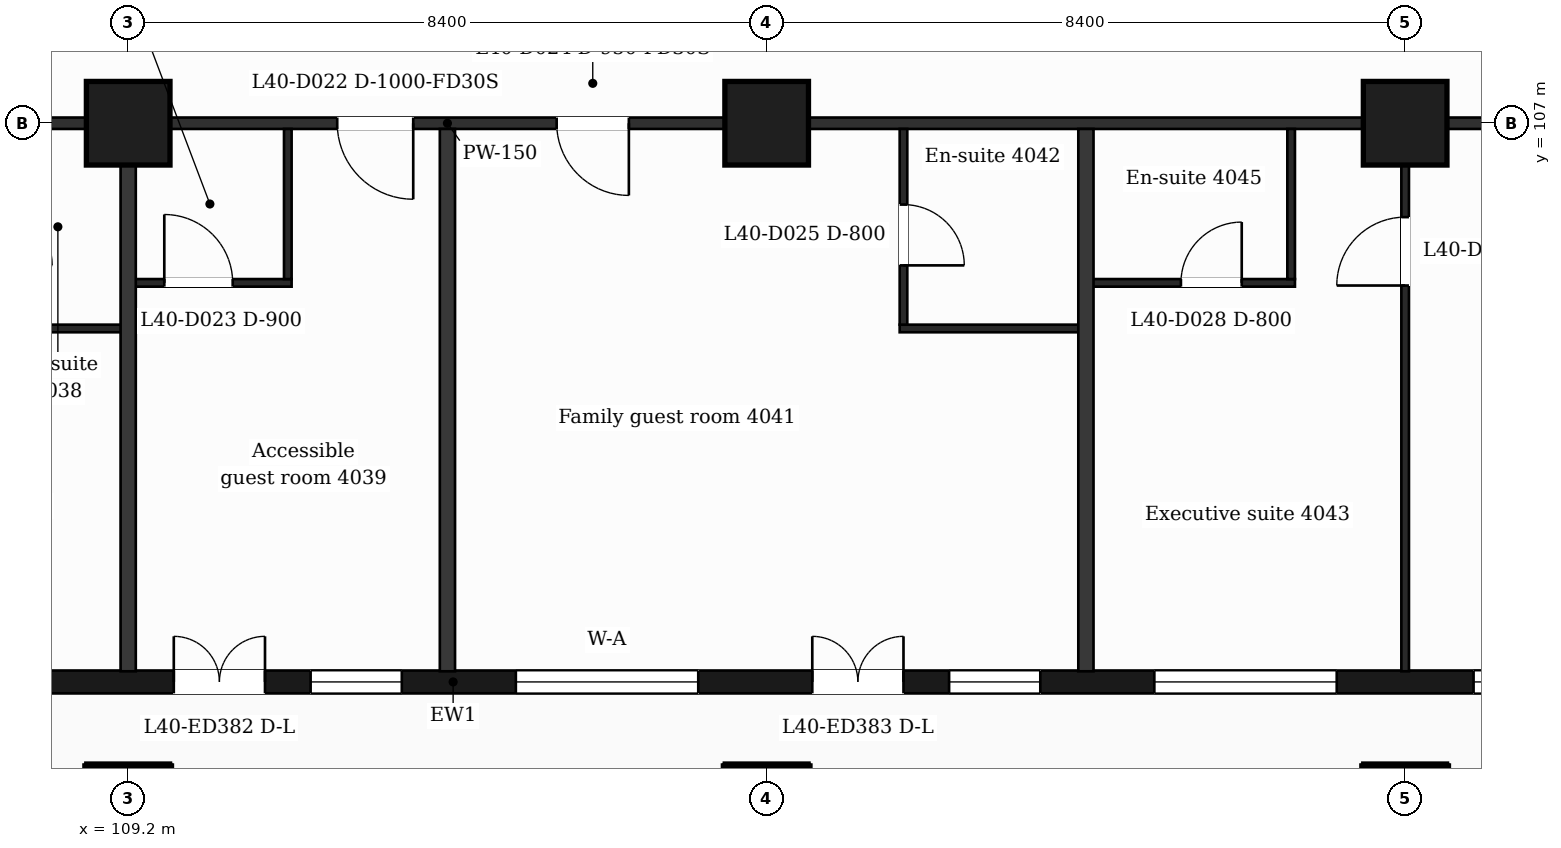
"""IFC4 building model, lengths in metres.
Left out: names, types, materials, properties, quantities, classifications, styles, units other than length and angle.
Written with IfcOpenShell. Run it as: python <this file> out.ifc"""

import sys

from ifc_helpers import new_model, si_unit, direction, frame, frame_2d, origin, origin_2d, place, context, subcontext, project, spatial, rectangle, extrude, element, fill, save


model = new_model("IFC4")
c1 = context("Model", 3, precision=1e-05, world=origin(), true_north=direction((0.0, 1.0)))
c2 = subcontext(c1, "Body", "Model", "MODEL_VIEW")
j1 = project(units=[si_unit("LENGTHUNIT", "METRE"), si_unit("PLANEANGLEUNIT", "RADIAN")], contexts=[c1])
p1 = place(None, origin())
s1 = spatial("IfcSite", under=j1, at=p1, CompositionType="ELEMENT")
p2 = place(p1, origin())
s2 = spatial("IfcBuilding", under=s1, at=p2, CompositionType="ELEMENT")
p3 = place(p2, frame((0.0, 0.0, 170.0)))
s3 = spatial("IfcBuildingStorey", under=s2, at=p3, CompositionType="ELEMENT", Elevation=170.0)
for number, where, z_axis, x_axis in (
    (1, (109.2, 98.0, 0.0), (0.0, 0.0, 1.0), (1.0, 0.0, 0.0)),
    (2, (117.6, 98.0, 0.0), (0.0, 0.0, 1.0), (1.0, 0.0, 0.0)),
    (3, (126.0, 98.0, 0.0), (0.0, 0.0, 1.0), (1.0, 0.0, 0.0)),
    (4, (109.2, 107.0, 0.0), (0.0, 0.0, 1.0), (1.0, 0.0, 0.0)),
    (5, (117.6, 107.0, 0.0), (0.0, 0.0, 1.0), (1.0, 0.0, 0.0)),
    (6, (126.0, 107.0, 0.0), (0.0, 0.0, 1.0), (1.0, 0.0, 0.0)),
):
    element("IfcColumn", number, at=place(p3, frame(where, z_axis=z_axis, x_axis=x_axis)), inside=s3, PredefinedType="COLUMN", context=c2, shape_type="SweptSolid", body=[
        extrude(rectangle(XDim=1.1, YDim=1.1, at=origin_2d()), origin(), (0.0, 0.0, 1.0), 3.7),
    ])
p4 = place(p3, frame((89.85, 99.65, 0.0), z_axis=(0.0, 0.0, 1.0), x_axis=(1.0, 0.0, 0.0)))
e7 = element("IfcWall", 7, at=p4, inside=s3, PredefinedType="SOLIDWALL", context=c2, shape_type="SweptSolid", body=[
    extrude(rectangle(XDim=47.25, YDim=0.3, at=frame_2d((23.625, 0.0))), origin(), (0.0, 0.0, 1.0), 3.38),
])
p5 = place(p4, frame((0.725, 0.0, 0.9)))
e8 = element("IfcOpeningElement", 8, at=p5, cuts=e7, PredefinedType="OPENING", context=c2, shape_type="SweptSolid", body=[
    extrude(rectangle(XDim=1.2, YDim=2.1, at=frame_2d((0.6, 1.05))), frame((0.0, 0.16, 0.0), z_axis=(0.0, -1.0, 0.0), x_axis=(1.0, 0.0, 0.0)), (0.0, 0.0, 1.0), 0.32),
])
p6 = place(p4, frame((3.45, 0.0, 0.9)))
e9 = element("IfcOpeningElement", 9, at=p6, cuts=e7, PredefinedType="OPENING", context=c2, shape_type="SweptSolid", body=[
    extrude(rectangle(XDim=2.4, YDim=2.1, at=frame_2d((1.2, 1.05))), frame((0.0, 0.16, 0.0), z_axis=(0.0, -1.0, 0.0), x_axis=(1.0, 0.0, 0.0)), (0.0, 0.0, 1.0), 0.32),
])
p7 = place(p4, frame((7.65, 0.0, 0.9)))
e10 = element("IfcOpeningElement", 10, at=p7, cuts=e7, PredefinedType="OPENING", context=c2, shape_type="SweptSolid", body=[
    extrude(rectangle(XDim=2.4, YDim=2.1, at=frame_2d((1.2, 1.05))), frame((0.0, 0.16, 0.0), z_axis=(0.0, -1.0, 0.0), x_axis=(1.0, 0.0, 0.0)), (0.0, 0.0, 1.0), 0.32),
])
p8 = place(p4, frame((12.45, 0.0, 0.9)))
e11 = element("IfcOpeningElement", 11, at=p8, cuts=e7, PredefinedType="OPENING", context=c2, shape_type="SweptSolid", body=[
    extrude(rectangle(XDim=1.2, YDim=2.1, at=frame_2d((0.6, 1.05))), frame((0.0, 0.16, 0.0), z_axis=(0.0, -1.0, 0.0), x_axis=(1.0, 0.0, 0.0)), (0.0, 0.0, 1.0), 0.32),
])
p9 = place(p4, frame((16.65, 0.0, 0.9)))
e12 = element("IfcOpeningElement", 12, at=p9, cuts=e7, PredefinedType="OPENING", context=c2, shape_type="SweptSolid", body=[
    extrude(rectangle(XDim=1.2, YDim=2.1, at=frame_2d((0.6, 1.05))), frame((0.0, 0.16, 0.0), z_axis=(0.0, -1.0, 0.0), x_axis=(1.0, 0.0, 0.0)), (0.0, 0.0, 1.0), 0.32),
])
p10 = place(p4, frame((19.95, 0.0, 0.0)))
e13 = element("IfcOpeningElement", 13, at=p10, cuts=e7, PredefinedType="OPENING", context=c2, shape_type="SweptSolid", body=[
    extrude(rectangle(XDim=1.2, YDim=2.4, at=frame_2d((0.6, 1.2))), frame((0.0, 0.16, 0.0), z_axis=(0.0, -1.0, 0.0), x_axis=(1.0, 0.0, 0.0)), (0.0, 0.0, 1.0), 0.32),
])
p11 = place(p4, frame((21.75, 0.0, 0.9)))
e14 = element("IfcOpeningElement", 14, at=p11, cuts=e7, PredefinedType="OPENING", context=c2, shape_type="SweptSolid", body=[
    extrude(rectangle(XDim=1.2, YDim=2.1, at=frame_2d((0.6, 1.05))), frame((0.0, 0.16, 0.0), z_axis=(0.0, -1.0, 0.0), x_axis=(1.0, 0.0, 0.0)), (0.0, 0.0, 1.0), 0.32),
])
p12 = place(p4, frame((24.45, 0.0, 0.9)))
e15 = element("IfcOpeningElement", 15, at=p12, cuts=e7, PredefinedType="OPENING", context=c2, shape_type="SweptSolid", body=[
    extrude(rectangle(XDim=2.4, YDim=2.1, at=frame_2d((1.2, 1.05))), frame((0.0, 0.16, 0.0), z_axis=(0.0, -1.0, 0.0), x_axis=(1.0, 0.0, 0.0)), (0.0, 0.0, 1.0), 0.32),
])
p13 = place(p4, frame((28.35, 0.0, 0.0)))
e16 = element("IfcOpeningElement", 16, at=p13, cuts=e7, PredefinedType="OPENING", context=c2, shape_type="SweptSolid", body=[
    extrude(rectangle(XDim=1.2, YDim=2.4, at=frame_2d((0.6, 1.2))), frame((0.0, 0.16, 0.0), z_axis=(0.0, -1.0, 0.0), x_axis=(1.0, 0.0, 0.0)), (0.0, 0.0, 1.0), 0.32),
])
p14 = place(p4, frame((30.15, 0.0, 0.9)))
e17 = element("IfcOpeningElement", 17, at=p14, cuts=e7, PredefinedType="OPENING", context=c2, shape_type="SweptSolid", body=[
    extrude(rectangle(XDim=1.2, YDim=2.1, at=frame_2d((0.6, 1.05))), frame((0.0, 0.16, 0.0), z_axis=(0.0, -1.0, 0.0), x_axis=(1.0, 0.0, 0.0)), (0.0, 0.0, 1.0), 0.32),
])
p15 = place(p4, frame((32.85, 0.0, 0.9)))
e18 = element("IfcOpeningElement", 18, at=p15, cuts=e7, PredefinedType="OPENING", context=c2, shape_type="SweptSolid", body=[
    extrude(rectangle(XDim=2.4, YDim=2.1, at=frame_2d((1.2, 1.05))), frame((0.0, 0.16, 0.0), z_axis=(0.0, -1.0, 0.0), x_axis=(1.0, 0.0, 0.0)), (0.0, 0.0, 1.0), 0.32),
])
p16 = place(p4, frame((37.05, 0.0, 0.9)))
e19 = element("IfcOpeningElement", 19, at=p16, cuts=e7, PredefinedType="OPENING", context=c2, shape_type="SweptSolid", body=[
    extrude(rectangle(XDim=2.4, YDim=2.1, at=frame_2d((1.2, 1.05))), frame((0.0, 0.16, 0.0), z_axis=(0.0, -1.0, 0.0), x_axis=(1.0, 0.0, 0.0)), (0.0, 0.0, 1.0), 0.32),
])
p17 = place(p4, frame((41.85, 0.0, 0.9)))
e20 = element("IfcOpeningElement", 20, at=p17, cuts=e7, PredefinedType="OPENING", context=c2, shape_type="SweptSolid", body=[
    extrude(rectangle(XDim=1.2, YDim=2.1, at=frame_2d((0.6, 1.05))), frame((0.0, 0.16, 0.0), z_axis=(0.0, -1.0, 0.0), x_axis=(1.0, 0.0, 0.0)), (0.0, 0.0, 1.0), 0.32),
])
p18 = place(p4, frame((45.25, 0.0, 0.9)))
e21 = element("IfcOpeningElement", 21, at=p18, cuts=e7, PredefinedType="OPENING", context=c2, shape_type="SweptSolid", body=[
    extrude(rectangle(XDim=1.2, YDim=2.1, at=frame_2d((0.6, 1.05))), frame((0.0, 0.16, 0.0), z_axis=(0.0, -1.0, 0.0), x_axis=(1.0, 0.0, 0.0)), (0.0, 0.0, 1.0), 0.32),
])
p19 = place(p3, frame((107.35, 104.3, 0.0), z_axis=(0.0, 0.0, 1.0), x_axis=(1.0, 0.0, 0.0)))
e22 = element("IfcWall", 22, at=p19, inside=s3, PredefinedType="PARTITIONING", context=c2, shape_type="SweptSolid", body=[
    extrude(rectangle(XDim=1.85, YDim=0.1, at=frame_2d((0.925, 0.0))), origin(), (0.0, 0.0, 1.0), 3.38),
])
p20 = place(p3, frame((119.35, 104.3, 0.0), z_axis=(0.0, 0.0, 1.0), x_axis=(1.0, 0.0, 0.0)))
e23 = element("IfcWall", 23, at=p20, inside=s3, PredefinedType="PARTITIONING", context=c2, shape_type="SweptSolid", body=[
    extrude(rectangle(XDim=2.45, YDim=0.1, at=frame_2d((1.225, 0.0))), origin(), (0.0, 0.0, 1.0), 3.38),
])
p21 = place(p3, frame((109.2, 104.9, 0.0), z_axis=(0.0, 0.0, 1.0), x_axis=(1.0, 0.0, 0.0)))
e24 = element("IfcWall", 24, at=p21, inside=s3, PredefinedType="PARTITIONING", context=c2, shape_type="SweptSolid", body=[
    extrude(rectangle(XDim=2.15, YDim=0.1, at=frame_2d((1.075, 0.0))), origin(), (0.0, 0.0, 1.0), 3.38),
])
p22 = place(p21, frame((0.475, 0.0, 0.0)))
e25 = element("IfcOpeningElement", 25, at=p22, cuts=e24, PredefinedType="OPENING", context=c2, shape_type="SweptSolid", body=[
    extrude(rectangle(XDim=0.9, YDim=2.1, at=frame_2d((0.45, 1.05))), frame((0.0, 0.06, 0.0), z_axis=(0.0, -1.0, 0.0), x_axis=(1.0, 0.0, 0.0)), (0.0, 0.0, 1.0), 0.12),
])
p23 = place(p3, frame((121.8, 104.9, 0.0), z_axis=(0.0, 0.0, 1.0), x_axis=(1.0, 0.0, 0.0)))
e26 = element("IfcWall", 26, at=p23, inside=s3, PredefinedType="PARTITIONING", context=c2, shape_type="SweptSolid", body=[
    extrude(rectangle(XDim=2.75, YDim=0.1, at=frame_2d((1.375, 0.0))), origin(), (0.0, 0.0, 1.0), 3.38),
])
p24 = place(p23, frame((1.25, 0.0, 0.0)))
e27 = element("IfcOpeningElement", 27, at=p24, cuts=e26, PredefinedType="OPENING", context=c2, shape_type="SweptSolid", body=[
    extrude(rectangle(XDim=0.8, YDim=2.1, at=frame_2d((0.4, 1.05))), frame((0.0, 0.06, 0.0), z_axis=(0.0, -1.0, 0.0), x_axis=(1.0, 0.0, 0.0)), (0.0, 0.0, 1.0), 0.12),
])
p25 = place(p3, frame((87.018, 107.0, 0.0), z_axis=(0.0, 0.0, 1.0), x_axis=(1.0, 0.0, 0.0)))
e28 = element("IfcWall", 28, at=p25, inside=s3, PredefinedType="PARTITIONING", context=c2, shape_type="SweptSolid", body=[
    extrude(rectangle(XDim=52.765, YDim=0.15, at=frame_2d((26.382, 0.0))), origin(), (0.0, 0.0, 1.0), 3.38),
])
p26 = place(p25, frame((0.463, 0.0, 0.0)))
e29 = element("IfcOpeningElement", 29, at=p26, cuts=e28, PredefinedType="OPENING", context=c2, shape_type="SweptSolid", body=[
    extrude(rectangle(XDim=0.95, YDim=2.1, at=frame_2d((0.475, 1.05))), frame((0.0, 0.085, 0.0), z_axis=(0.0, -1.0, 0.0), x_axis=(1.0, 0.0, 0.0)), (0.0, 0.0, 1.0), 0.17),
])
p27 = place(p25, frame((6.369, 0.0, 0.0)))
e30 = element("IfcOpeningElement", 30, at=p27, cuts=e28, PredefinedType="OPENING", context=c2, shape_type="SweptSolid", body=[
    extrude(rectangle(XDim=0.95, YDim=2.1, at=frame_2d((0.475, 1.05))), frame((0.0, 0.085, 0.0), z_axis=(0.0, -1.0, 0.0), x_axis=(1.0, 0.0, 0.0)), (0.0, 0.0, 1.0), 0.17),
])
p28 = place(p25, frame((9.857, 0.0, 0.0)))
e31 = element("IfcOpeningElement", 31, at=p28, cuts=e28, PredefinedType="OPENING", context=c2, shape_type="SweptSolid", body=[
    extrude(rectangle(XDim=0.95, YDim=2.1, at=frame_2d((0.475, 1.05))), frame((0.0, 0.085, 0.0), z_axis=(0.0, -1.0, 0.0), x_axis=(1.0, 0.0, 0.0)), (0.0, 0.0, 1.0), 0.17),
])
p29 = place(p25, frame((15.382, 0.0, 0.0)))
e32 = element("IfcOpeningElement", 32, at=p29, cuts=e28, PredefinedType="OPENING", context=c2, shape_type="SweptSolid", body=[
    extrude(rectangle(XDim=1.0, YDim=2.1, at=frame_2d((0.5, 1.05))), frame((0.0, 0.085, 0.0), z_axis=(0.0, -1.0, 0.0), x_axis=(1.0, 0.0, 0.0)), (0.0, 0.0, 1.0), 0.17),
])
p30 = place(p25, frame((24.932, 0.0, 0.0)))
e33 = element("IfcOpeningElement", 33, at=p30, cuts=e28, PredefinedType="OPENING", context=c2, shape_type="SweptSolid", body=[
    extrude(rectangle(XDim=1.0, YDim=2.1, at=frame_2d((0.5, 1.05))), frame((0.0, 0.085, 0.0), z_axis=(0.0, -1.0, 0.0), x_axis=(1.0, 0.0, 0.0)), (0.0, 0.0, 1.0), 0.17),
])
p31 = place(p25, frame((27.819, 0.0, 0.0)))
e34 = element("IfcOpeningElement", 34, at=p31, cuts=e28, PredefinedType="OPENING", context=c2, shape_type="SweptSolid", body=[
    extrude(rectangle(XDim=0.95, YDim=2.1, at=frame_2d((0.475, 1.05))), frame((0.0, 0.085, 0.0), z_axis=(0.0, -1.0, 0.0), x_axis=(1.0, 0.0, 0.0)), (0.0, 0.0, 1.0), 0.17),
])
p32 = place(p25, frame((42.012, 0.0, 0.0)))
e35 = element("IfcOpeningElement", 35, at=p32, cuts=e28, PredefinedType="OPENING", context=c2, shape_type="SweptSolid", body=[
    extrude(rectangle(XDim=1.0, YDim=2.1, at=frame_2d((0.5, 1.05))), frame((0.0, 0.085, 0.0), z_axis=(0.0, -1.0, 0.0), x_axis=(1.0, 0.0, 0.0)), (0.0, 0.0, 1.0), 0.17),
])
p33 = place(p25, frame((48.249, 0.0, 0.0)))
e36 = element("IfcOpeningElement", 36, at=p33, cuts=e28, PredefinedType="OPENING", context=c2, shape_type="SweptSolid", body=[
    extrude(rectangle(XDim=0.95, YDim=2.1, at=frame_2d((0.475, 1.05))), frame((0.0, 0.085, 0.0), z_axis=(0.0, -1.0, 0.0), x_axis=(1.0, 0.0, 0.0)), (0.0, 0.0, 1.0), 0.17),
])
p34 = place(p3, frame((109.2, 99.79, 0.0), z_axis=(0.0, 0.0, 1.0), x_axis=(0.0, 1.0, 0.0)))
e37 = element("IfcWall", 37, at=p34, inside=s3, PredefinedType="PARTITIONING", context=c2, shape_type="SweptSolid", body=[
    extrude(rectangle(XDim=7.135, YDim=0.2, at=frame_2d((3.567, 0.0))), origin(), (0.0, 0.0, 1.0), 3.38),
])
p35 = place(p3, frame((111.3, 104.95, 0.0), z_axis=(0.0, 0.0, 1.0), x_axis=(0.0, 1.0, 0.0)))
e38 = element("IfcWall", 38, at=p35, inside=s3, PredefinedType="PARTITIONING", context=c2, shape_type="SweptSolid", body=[
    extrude(rectangle(XDim=1.975, YDim=0.1, at=frame_2d((0.988, 0.0))), origin(), (0.0, 0.0, 1.0), 3.38),
])
p36 = place(p3, frame((113.4, 99.79, 0.0), z_axis=(0.0, 0.0, 1.0), x_axis=(0.0, 1.0, 0.0)))
e39 = element("IfcWall", 39, at=p36, inside=s3, PredefinedType="PARTITIONING", context=c2, shape_type="SweptSolid", body=[
    extrude(rectangle(XDim=7.135, YDim=0.2, at=frame_2d((3.567, 0.0))), origin(), (0.0, 0.0, 1.0), 3.38),
])
p37 = place(p3, frame((119.4, 104.35, 0.0), z_axis=(0.0, 0.0, 1.0), x_axis=(0.0, 1.0, 0.0)))
e40 = element("IfcWall", 40, at=p37, inside=s3, PredefinedType="PARTITIONING", context=c2, shape_type="SweptSolid", body=[
    extrude(rectangle(XDim=2.575, YDim=0.1, at=frame_2d((1.288, 0.0))), origin(), (0.0, 0.0, 1.0), 3.38),
])
p38 = place(p37, frame((0.78, 0.0, 0.0)))
e41 = element("IfcOpeningElement", 41, at=p38, cuts=e40, PredefinedType="OPENING", context=c2, shape_type="SweptSolid", body=[
    extrude(rectangle(XDim=0.8, YDim=2.1, at=frame_2d((0.4, 1.05))), frame((0.0, 0.06, 0.0), z_axis=(0.0, -1.0, 0.0), x_axis=(1.0, 0.0, 0.0)), (0.0, 0.0, 1.0), 0.12),
])
p39 = place(p3, frame((121.8, 99.79, 0.0), z_axis=(0.0, 0.0, 1.0), x_axis=(0.0, 1.0, 0.0)))
e42 = element("IfcWall", 42, at=p39, inside=s3, PredefinedType="PARTITIONING", context=c2, shape_type="SweptSolid", body=[
    extrude(rectangle(XDim=7.135, YDim=0.2, at=frame_2d((3.567, 0.0))), origin(), (0.0, 0.0, 1.0), 3.38),
])
p40 = place(p3, frame((124.5, 104.95, 0.0), z_axis=(0.0, 0.0, 1.0), x_axis=(0.0, 1.0, 0.0)))
e43 = element("IfcWall", 43, at=p40, inside=s3, PredefinedType="PARTITIONING", context=c2, shape_type="SweptSolid", body=[
    extrude(rectangle(XDim=1.975, YDim=0.1, at=frame_2d((0.988, 0.0))), origin(), (0.0, 0.0, 1.0), 3.38),
])
p41 = place(p3, frame((126.0, 99.79, 0.0), z_axis=(0.0, 0.0, 1.0), x_axis=(0.0, 1.0, 0.0)))
e44 = element("IfcWall", 44, at=p41, inside=s3, PredefinedType="PARTITIONING", context=c2, shape_type="SweptSolid", body=[
    extrude(rectangle(XDim=7.135, YDim=0.1, at=frame_2d((3.567, 0.0))), origin(), (0.0, 0.0, 1.0), 3.38),
])
p42 = place(p41, frame((5.075, 0.0, 0.0)))
e45 = element("IfcOpeningElement", 45, at=p42, cuts=e44, PredefinedType="OPENING", context=c2, shape_type="SweptSolid", body=[
    extrude(rectangle(XDim=0.9, YDim=2.1, at=frame_2d((0.45, 1.05))), frame((0.0, 0.06, 0.0), z_axis=(0.0, -1.0, 0.0), x_axis=(1.0, 0.0, 0.0)), (0.0, 0.0, 1.0), 0.12),
])
p43 = place(p10, origin())
e46 = element("IfcDoor", 46, at=p43, inside=s3, OperationType="DOUBLE_DOOR_SINGLE_SWING", PredefinedType="DOOR", context=c2, shape_type="SweptSolid", body=[
    extrude(rectangle(XDim=1.2, YDim=2.4, at=frame_2d((0.6, 1.2))), frame((0.0, 0.025, 0.0), z_axis=(0.0, -1.0, 0.0), x_axis=(1.0, 0.0, 0.0)), (0.0, 0.0, 1.0), 0.05),
])
fill(e13, e46)
p44 = place(p11, origin())
e47 = element("IfcWindow", 47, at=p44, inside=s3, PartitioningType="SINGLE_PANEL", PredefinedType="WINDOW", context=c2, shape_type="SweptSolid", body=[
    extrude(rectangle(XDim=1.2, YDim=2.1, at=frame_2d((0.6, 1.05))), frame((0.0, 0.03, 0.0), z_axis=(0.0, -1.0, 0.0), x_axis=(1.0, 0.0, 0.0)), (0.0, 0.0, 1.0), 0.06),
])
fill(e14, e47)
p45 = place(p12, origin())
e48 = element("IfcWindow", 48, at=p45, inside=s3, PartitioningType="SINGLE_PANEL", PredefinedType="WINDOW", context=c2, shape_type="SweptSolid", body=[
    extrude(rectangle(XDim=2.4, YDim=2.1, at=frame_2d((1.2, 1.05))), frame((0.0, 0.03, 0.0), z_axis=(0.0, -1.0, 0.0), x_axis=(1.0, 0.0, 0.0)), (0.0, 0.0, 1.0), 0.06),
])
fill(e15, e48)
p46 = place(p13, origin())
e49 = element("IfcDoor", 49, at=p46, inside=s3, OperationType="DOUBLE_DOOR_SINGLE_SWING", PredefinedType="DOOR", context=c2, shape_type="SweptSolid", body=[
    extrude(rectangle(XDim=1.2, YDim=2.4, at=frame_2d((0.6, 1.2))), frame((0.0, 0.025, 0.0), z_axis=(0.0, -1.0, 0.0), x_axis=(1.0, 0.0, 0.0)), (0.0, 0.0, 1.0), 0.05),
])
fill(e16, e49)
p47 = place(p14, origin())
e50 = element("IfcWindow", 50, at=p47, inside=s3, PartitioningType="SINGLE_PANEL", PredefinedType="WINDOW", context=c2, shape_type="SweptSolid", body=[
    extrude(rectangle(XDim=1.2, YDim=2.1, at=frame_2d((0.6, 1.05))), frame((0.0, 0.03, 0.0), z_axis=(0.0, -1.0, 0.0), x_axis=(1.0, 0.0, 0.0)), (0.0, 0.0, 1.0), 0.06),
])
fill(e17, e50)
p48 = place(p15, origin())
e51 = element("IfcWindow", 51, at=p48, inside=s3, PartitioningType="SINGLE_PANEL", PredefinedType="WINDOW", context=c2, shape_type="SweptSolid", body=[
    extrude(rectangle(XDim=2.4, YDim=2.1, at=frame_2d((1.2, 1.05))), frame((0.0, 0.03, 0.0), z_axis=(0.0, -1.0, 0.0), x_axis=(1.0, 0.0, 0.0)), (0.0, 0.0, 1.0), 0.06),
])
fill(e18, e51)
p49 = place(p16, origin())
e52 = element("IfcWindow", 52, at=p49, inside=s3, PartitioningType="SINGLE_PANEL", PredefinedType="WINDOW", context=c2, shape_type="SweptSolid", body=[
    extrude(rectangle(XDim=2.4, YDim=2.1, at=frame_2d((1.2, 1.05))), frame((0.0, 0.03, 0.0), z_axis=(0.0, -1.0, 0.0), x_axis=(1.0, 0.0, 0.0)), (0.0, 0.0, 1.0), 0.06),
])
fill(e19, e52)
p50 = place(p30, origin())
e53 = element("IfcDoor", 53, at=p50, inside=s3, OperationType="SINGLE_SWING_RIGHT", PredefinedType="DOOR", context=c2, shape_type="SweptSolid", body=[
    extrude(rectangle(XDim=1.0, YDim=2.1, at=frame_2d((0.5, 1.05))), frame((0.0, 0.025, 0.0), z_axis=(0.0, -1.0, 0.0), x_axis=(1.0, 0.0, 0.0)), (0.0, 0.0, 1.0), 0.05),
])
fill(e33, e53)
p51 = place(p22, origin())
e54 = element("IfcDoor", 54, at=p51, inside=s3, OperationType="SINGLE_SWING_LEFT", PredefinedType="DOOR", context=c2, shape_type="SweptSolid", body=[
    extrude(rectangle(XDim=0.9, YDim=2.1, at=frame_2d((0.45, 1.05))), frame((0.0, 0.025, 0.0), z_axis=(0.0, -1.0, 0.0), x_axis=(1.0, 0.0, 0.0)), (0.0, 0.0, 1.0), 0.05),
])
fill(e25, e54)
p52 = place(p31, origin())
e55 = element("IfcDoor", 55, at=p52, inside=s3, OperationType="SINGLE_SWING_RIGHT", PredefinedType="DOOR", context=c2, shape_type="SweptSolid", body=[
    extrude(rectangle(XDim=0.95, YDim=2.1, at=frame_2d((0.475, 1.05))), frame((0.0, 0.025, 0.0), z_axis=(0.0, -1.0, 0.0), x_axis=(1.0, 0.0, 0.0)), (0.0, 0.0, 1.0), 0.05),
])
fill(e34, e55)
p53 = place(p38, origin())
e56 = element("IfcDoor", 56, at=p53, inside=s3, OperationType="SINGLE_SWING_LEFT", PredefinedType="DOOR", context=c2, shape_type="SweptSolid", body=[
    extrude(rectangle(XDim=0.8, YDim=2.1, at=frame_2d((0.4, 1.05))), frame((0.0, 0.025, 0.0), z_axis=(0.0, -1.0, 0.0), x_axis=(1.0, 0.0, 0.0)), (0.0, 0.0, 1.0), 0.05),
])
fill(e41, e56)
p54 = place(p42, origin())
e57 = element("IfcDoor", 57, at=p54, inside=s3, OperationType="SINGLE_SWING_LEFT", PredefinedType="DOOR", context=c2, shape_type="SweptSolid", body=[
    extrude(rectangle(XDim=0.9, YDim=2.1, at=frame_2d((0.45, 1.05))), frame((0.0, 0.025, 0.0), z_axis=(0.0, -1.0, 0.0), x_axis=(1.0, 0.0, 0.0)), (0.0, 0.0, 1.0), 0.05),
])
fill(e45, e57)
p55 = place(p24, origin())
e58 = element("IfcDoor", 58, at=p55, inside=s3, OperationType="SINGLE_SWING_RIGHT", PredefinedType="DOOR", context=c2, shape_type="SweptSolid", body=[
    extrude(rectangle(XDim=0.8, YDim=2.1, at=frame_2d((0.4, 1.05))), frame((0.0, 0.025, 0.0), z_axis=(0.0, -1.0, 0.0), x_axis=(1.0, 0.0, 0.0)), (0.0, 0.0, 1.0), 0.05),
])
fill(e27, e58)
save(model, sys.argv[1])
